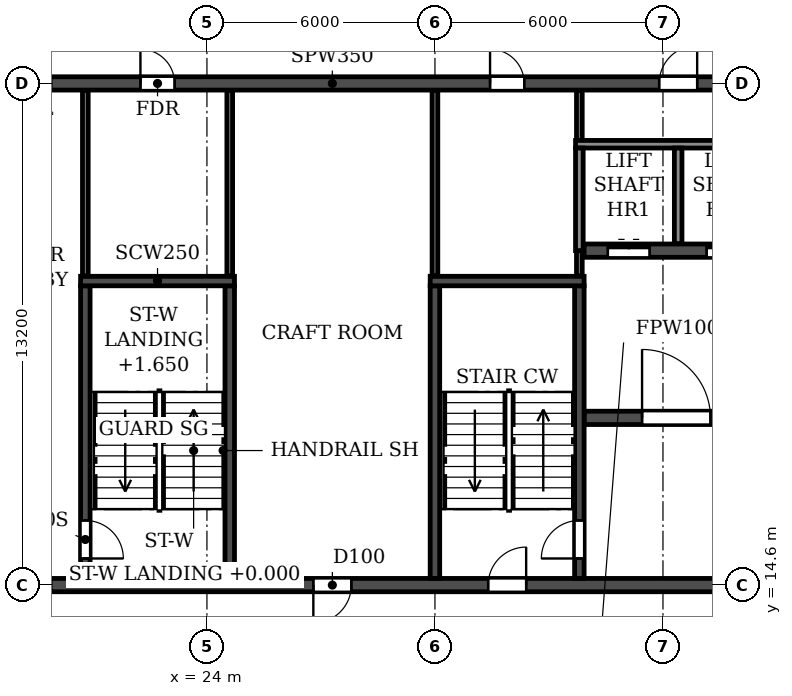
"""IFC4 building model, lengths in metres.
Left out: names, types, materials, properties, quantities, classifications, styles, units other than length and angle.
Written with IfcOpenShell. Run it as: python <this file> out.ifc"""

import sys

from ifc_helpers import new_model, si_unit, direction, frame, frame_2d, origin, place, context, subcontext, project, spatial, rectangle, extrude, element, fill, save


model = new_model("IFC4")
c1 = context("Model", 3, precision=1e-05, world=origin(), true_north=direction((0.0, 1.0)))
c2 = subcontext(c1, "Body", "Model", "MODEL_VIEW")
j1 = project(units=[si_unit("LENGTHUNIT", "METRE"), si_unit("PLANEANGLEUNIT", "RADIAN")], contexts=[c1])
p1 = place(None, origin())
s1 = spatial("IfcSite", under=j1, at=p1, CompositionType="ELEMENT")
p2 = place(p1, origin())
s2 = spatial("IfcBuilding", under=s1, at=p2, CompositionType="ELEMENT")
p3 = place(p2, frame((0.0, 0.0, 221.4)))
s3 = spatial("IfcBuildingStorey", under=s2, at=p3, CompositionType="ELEMENT", Elevation=221.4)
p4 = place(p3, frame((18.2, 14.6, 0.0), z_axis=(0.0, 0.0, 1.0), x_axis=(1.0, 0.0, 0.0)))
e1 = element("IfcWall", 1, at=p4, inside=s3, PredefinedType="SOLIDWALL", context=c2, shape_type="SweptSolid", body=[
    extrude(rectangle(XDim=65.6, YDim=0.35, at=frame_2d((32.8, 0.0))), origin(), (0.0, 0.0, 1.0), 3.08),
])
p5 = place(p4, frame((0.7, 0.0, 0.0)))
e2 = element("IfcOpeningElement", 2, at=p5, cuts=e1, PredefinedType="OPENING", context=c2, shape_type="SweptSolid", body=[
    extrude(rectangle(XDim=1.0, YDim=2.1, at=frame_2d((0.5, 1.05))), frame((0.0, 0.185, 0.0), z_axis=(0.0, -1.0, 0.0), x_axis=(1.0, 0.0, 0.0)), (0.0, 0.0, 1.0), 0.37),
])
p6 = place(p4, frame((8.6, 0.0, 0.0)))
e3 = element("IfcOpeningElement", 3, at=p6, cuts=e1, PredefinedType="OPENING", context=c2, shape_type="SweptSolid", body=[
    extrude(rectangle(XDim=1.0, YDim=2.1, at=frame_2d((0.5, 1.05))), frame((0.0, 0.185, 0.0), z_axis=(0.0, -1.0, 0.0), x_axis=(1.0, 0.0, 0.0)), (0.0, 0.0, 1.0), 0.37),
])
p7 = place(p4, frame((13.2, 0.0, 0.0)))
e4 = element("IfcOpeningElement", 4, at=p7, cuts=e1, PredefinedType="OPENING", context=c2, shape_type="SweptSolid", body=[
    extrude(rectangle(XDim=1.0, YDim=2.1, at=frame_2d((0.5, 1.05))), frame((0.0, 0.185, 0.0), z_axis=(0.0, -1.0, 0.0), x_axis=(1.0, 0.0, 0.0)), (0.0, 0.0, 1.0), 0.37),
])
p8 = place(p4, frame((27.1, 0.0, 0.0)))
e5 = element("IfcOpeningElement", 5, at=p8, cuts=e1, PredefinedType="OPENING", context=c2, shape_type="SweptSolid", body=[
    extrude(rectangle(XDim=1.0, YDim=2.1, at=frame_2d((0.5, 1.05))), frame((0.0, 0.185, 0.0), z_axis=(0.0, -1.0, 0.0), x_axis=(1.0, 0.0, 0.0)), (0.0, 0.0, 1.0), 0.37),
])
p9 = place(p4, frame((32.3, 0.0, 0.0)))
e6 = element("IfcOpeningElement", 6, at=p9, cuts=e1, PredefinedType="OPENING", context=c2, shape_type="SweptSolid", body=[
    extrude(rectangle(XDim=1.0, YDim=2.1, at=frame_2d((0.5, 1.05))), frame((0.0, 0.185, 0.0), z_axis=(0.0, -1.0, 0.0), x_axis=(1.0, 0.0, 0.0)), (0.0, 0.0, 1.0), 0.37),
])
p10 = place(p4, frame((35.95, 0.0, 0.0)))
e7 = element("IfcOpeningElement", 7, at=p10, cuts=e1, PredefinedType="OPENING", context=c2, shape_type="SweptSolid", body=[
    extrude(rectangle(XDim=1.5, YDim=2.1, at=frame_2d((0.75, 1.05))), frame((0.0, 0.185, 0.0), z_axis=(0.0, -1.0, 0.0), x_axis=(1.0, 0.0, 0.0)), (0.0, 0.0, 1.0), 0.37),
])
p11 = place(p4, frame((40.1, 0.0, 0.0)))
e8 = element("IfcOpeningElement", 8, at=p11, cuts=e1, PredefinedType="OPENING", context=c2, shape_type="SweptSolid", body=[
    extrude(rectangle(XDim=1.0, YDim=2.1, at=frame_2d((0.5, 1.05))), frame((0.0, 0.185, 0.0), z_axis=(0.0, -1.0, 0.0), x_axis=(1.0, 0.0, 0.0)), (0.0, 0.0, 1.0), 0.37),
])
p12 = place(p4, frame((51.4, 0.0, 0.0)))
e9 = element("IfcOpeningElement", 9, at=p12, cuts=e1, PredefinedType="OPENING", context=c2, shape_type="SweptSolid", body=[
    extrude(rectangle(XDim=1.0, YDim=2.1, at=frame_2d((0.5, 1.05))), frame((0.0, 0.185, 0.0), z_axis=(0.0, -1.0, 0.0), x_axis=(1.0, 0.0, 0.0)), (0.0, 0.0, 1.0), 0.37),
])
p13 = place(p4, frame((56.0, 0.0, 0.0)))
e10 = element("IfcOpeningElement", 10, at=p13, cuts=e1, PredefinedType="OPENING", context=c2, shape_type="SweptSolid", body=[
    extrude(rectangle(XDim=1.0, YDim=2.1, at=frame_2d((0.5, 1.05))), frame((0.0, 0.185, 0.0), z_axis=(0.0, -1.0, 0.0), x_axis=(1.0, 0.0, 0.0)), (0.0, 0.0, 1.0), 0.37),
])
p14 = place(p4, frame((63.9, 0.0, 0.0)))
e11 = element("IfcOpeningElement", 11, at=p14, cuts=e1, PredefinedType="OPENING", context=c2, shape_type="SweptSolid", body=[
    extrude(rectangle(XDim=1.0, YDim=2.1, at=frame_2d((0.5, 1.05))), frame((0.0, 0.185, 0.0), z_axis=(0.0, -1.0, 0.0), x_axis=(1.0, 0.0, 0.0)), (0.0, 0.0, 1.0), 0.37),
])
p15 = place(p3, frame((18.2, 27.8, 0.0), z_axis=(0.0, 0.0, 1.0), x_axis=(1.0, 0.0, 0.0)))
e12 = element("IfcWall", 12, at=p15, inside=s3, PredefinedType="SOLIDWALL", context=c2, shape_type="SweptSolid", body=[
    extrude(rectangle(XDim=65.6, YDim=0.35, at=frame_2d((32.8, 0.0))), origin(), (0.0, 0.0, 1.0), 3.08),
])
p16 = place(p15, frame((0.7, 0.0, 0.0)))
e13 = element("IfcOpeningElement", 13, at=p16, cuts=e12, PredefinedType="OPENING", context=c2, shape_type="SweptSolid", body=[
    extrude(rectangle(XDim=1.0, YDim=2.1, at=frame_2d((0.5, 1.05))), frame((0.0, 0.185, 0.0), z_axis=(0.0, -1.0, 0.0), x_axis=(1.0, 0.0, 0.0)), (0.0, 0.0, 1.0), 0.37),
])
p17 = place(p15, frame((4.05, 0.0, 0.0)))
e14 = element("IfcOpeningElement", 14, at=p17, cuts=e12, PredefinedType="OPENING", context=c2, shape_type="SweptSolid", body=[
    extrude(rectangle(XDim=0.9, YDim=2.1, at=frame_2d((0.45, 1.05))), frame((0.0, 0.185, 0.0), z_axis=(0.0, -1.0, 0.0), x_axis=(1.0, 0.0, 0.0)), (0.0, 0.0, 1.0), 0.37),
])
p18 = place(p15, frame((13.25, 0.0, 0.0)))
e15 = element("IfcOpeningElement", 15, at=p18, cuts=e12, PredefinedType="OPENING", context=c2, shape_type="SweptSolid", body=[
    extrude(rectangle(XDim=0.9, YDim=2.1, at=frame_2d((0.45, 1.05))), frame((0.0, 0.185, 0.0), z_axis=(0.0, -1.0, 0.0), x_axis=(1.0, 0.0, 0.0)), (0.0, 0.0, 1.0), 0.37),
])
p19 = place(p15, frame((17.7, 0.0, 0.0)))
e16 = element("IfcOpeningElement", 16, at=p19, cuts=e12, PredefinedType="OPENING", context=c2, shape_type="SweptSolid", body=[
    extrude(rectangle(XDim=1.0, YDim=2.1, at=frame_2d((0.5, 1.05))), frame((0.0, 0.185, 0.0), z_axis=(0.0, -1.0, 0.0), x_axis=(1.0, 0.0, 0.0)), (0.0, 0.0, 1.0), 0.37),
])
p20 = place(p15, frame((22.9, 0.0, 0.0)))
e17 = element("IfcOpeningElement", 17, at=p20, cuts=e12, PredefinedType="OPENING", context=c2, shape_type="SweptSolid", body=[
    extrude(rectangle(XDim=1.0, YDim=2.1, at=frame_2d((0.5, 1.05))), frame((0.0, 0.185, 0.0), z_axis=(0.0, -1.0, 0.0), x_axis=(1.0, 0.0, 0.0)), (0.0, 0.0, 1.0), 0.37),
])
p21 = place(p15, frame((29.4, 0.0, 0.0)))
e18 = element("IfcOpeningElement", 18, at=p21, cuts=e12, PredefinedType="OPENING", context=c2, shape_type="SweptSolid", body=[
    extrude(rectangle(XDim=1.0, YDim=2.1, at=frame_2d((0.5, 1.05))), frame((0.0, 0.185, 0.0), z_axis=(0.0, -1.0, 0.0), x_axis=(1.0, 0.0, 0.0)), (0.0, 0.0, 1.0), 0.37),
])
p22 = place(p15, frame((32.3, 0.0, 0.0)))
e19 = element("IfcOpeningElement", 19, at=p22, cuts=e12, PredefinedType="OPENING", context=c2, shape_type="SweptSolid", body=[
    extrude(rectangle(XDim=1.0, YDim=2.1, at=frame_2d((0.5, 1.05))), frame((0.0, 0.185, 0.0), z_axis=(0.0, -1.0, 0.0), x_axis=(1.0, 0.0, 0.0)), (0.0, 0.0, 1.0), 0.37),
])
p23 = place(p15, frame((36.25, 0.0, 0.0)))
e20 = element("IfcOpeningElement", 20, at=p23, cuts=e12, PredefinedType="OPENING", context=c2, shape_type="SweptSolid", body=[
    extrude(rectangle(XDim=1.5, YDim=2.1, at=frame_2d((0.75, 1.05))), frame((0.0, 0.185, 0.0), z_axis=(0.0, -1.0, 0.0), x_axis=(1.0, 0.0, 0.0)), (0.0, 0.0, 1.0), 0.37),
])
p24 = place(p15, frame((41.7, 0.0, 0.0)))
e21 = element("IfcOpeningElement", 21, at=p24, cuts=e12, PredefinedType="OPENING", context=c2, shape_type="SweptSolid", body=[
    extrude(rectangle(XDim=1.0, YDim=2.1, at=frame_2d((0.5, 1.05))), frame((0.0, 0.185, 0.0), z_axis=(0.0, -1.0, 0.0), x_axis=(1.0, 0.0, 0.0)), (0.0, 0.0, 1.0), 0.37),
])
p25 = place(p15, frame((46.9, 0.0, 0.0)))
e22 = element("IfcOpeningElement", 22, at=p25, cuts=e12, PredefinedType="OPENING", context=c2, shape_type="SweptSolid", body=[
    extrude(rectangle(XDim=1.0, YDim=2.1, at=frame_2d((0.5, 1.05))), frame((0.0, 0.185, 0.0), z_axis=(0.0, -1.0, 0.0), x_axis=(1.0, 0.0, 0.0)), (0.0, 0.0, 1.0), 0.37),
])
p26 = place(p15, frame((51.45, 0.0, 0.0)))
e23 = element("IfcOpeningElement", 23, at=p26, cuts=e12, PredefinedType="OPENING", context=c2, shape_type="SweptSolid", body=[
    extrude(rectangle(XDim=0.9, YDim=2.1, at=frame_2d((0.45, 1.05))), frame((0.0, 0.185, 0.0), z_axis=(0.0, -1.0, 0.0), x_axis=(1.0, 0.0, 0.0)), (0.0, 0.0, 1.0), 0.37),
])
p27 = place(p15, frame((60.65, 0.0, 0.0)))
e24 = element("IfcOpeningElement", 24, at=p27, cuts=e12, PredefinedType="OPENING", context=c2, shape_type="SweptSolid", body=[
    extrude(rectangle(XDim=0.9, YDim=2.1, at=frame_2d((0.45, 1.05))), frame((0.0, 0.185, 0.0), z_axis=(0.0, -1.0, 0.0), x_axis=(1.0, 0.0, 0.0)), (0.0, 0.0, 1.0), 0.37),
])
p28 = place(p15, frame((63.9, 0.0, 0.0)))
e25 = element("IfcOpeningElement", 25, at=p28, cuts=e12, PredefinedType="OPENING", context=c2, shape_type="SweptSolid", body=[
    extrude(rectangle(XDim=1.0, YDim=2.1, at=frame_2d((0.5, 1.05))), frame((0.0, 0.185, 0.0), z_axis=(0.0, -1.0, 0.0), x_axis=(1.0, 0.0, 0.0)), (0.0, 0.0, 1.0), 0.37),
])
p29 = place(p3, frame((33.925, 19.0, 0.0), z_axis=(0.0, 0.0, 1.0), x_axis=(1.0, 0.0, 0.0)))
e26 = element("IfcWall", 26, at=p29, inside=s3, PredefinedType="SOLIDWALL", context=c2, shape_type="SweptSolid", body=[
    extrude(rectangle(XDim=34.15, YDim=0.35, at=frame_2d((17.075, 0.0))), origin(), (0.0, 0.0, 1.0), 3.08),
])
p30 = place(p29, frame((16.175, 0.0, 0.0)))
e27 = element("IfcOpeningElement", 27, at=p30, cuts=e26, PredefinedType="OPENING", context=c2, shape_type="SweptSolid", body=[
    extrude(rectangle(XDim=1.8, YDim=2.1, at=frame_2d((0.9, 1.05))), frame((0.0, 0.185, 0.0), z_axis=(0.0, -1.0, 0.0), x_axis=(1.0, 0.0, 0.0)), (0.0, 0.0, 1.0), 0.37),
])
p31 = place(p29, frame((1.525, 0.0, 0.0)))
e28 = element("IfcOpeningElement", 28, at=p31, cuts=e26, PredefinedType="OPENING", context=c2, shape_type="SweptSolid", body=[
    extrude(rectangle(XDim=1.8, YDim=2.1, at=frame_2d((0.9, 1.05))), frame((0.0, 0.185, 0.0), z_axis=(0.0, -1.0, 0.0), x_axis=(1.0, 0.0, 0.0)), (0.0, 0.0, 1.0), 0.37),
])
p32 = place(p29, frame((30.825, 0.0, 0.0)))
e29 = element("IfcOpeningElement", 29, at=p32, cuts=e26, PredefinedType="OPENING", context=c2, shape_type="SweptSolid", body=[
    extrude(rectangle(XDim=1.8, YDim=2.1, at=frame_2d((0.9, 1.05))), frame((0.0, 0.185, 0.0), z_axis=(0.0, -1.0, 0.0), x_axis=(1.0, 0.0, 0.0)), (0.0, 0.0, 1.0), 0.37),
])
p33 = place(p3, frame((33.925, 23.4, 0.0), z_axis=(0.0, 0.0, 1.0), x_axis=(1.0, 0.0, 0.0)))
e30 = element("IfcWall", 30, at=p33, inside=s3, PredefinedType="SOLIDWALL", context=c2, shape_type="SweptSolid", body=[
    extrude(rectangle(XDim=34.15, YDim=0.35, at=frame_2d((17.075, 0.0))), origin(), (0.0, 0.0, 1.0), 3.08),
])
p34 = place(p33, frame((16.175, 0.0, 0.0)))
e31 = element("IfcOpeningElement", 31, at=p34, cuts=e30, PredefinedType="OPENING", context=c2, shape_type="SweptSolid", body=[
    extrude(rectangle(XDim=1.8, YDim=2.1, at=frame_2d((0.9, 1.05))), frame((0.0, 0.185, 0.0), z_axis=(0.0, -1.0, 0.0), x_axis=(1.0, 0.0, 0.0)), (0.0, 0.0, 1.0), 0.37),
])
p35 = place(p33, frame((0.625, 0.0, 0.0)))
e32 = element("IfcOpeningElement", 32, at=p35, cuts=e30, PredefinedType="OPENING", context=c2, shape_type="SweptSolid", body=[
    extrude(rectangle(XDim=1.1, YDim=2.1, at=frame_2d((0.55, 1.05))), frame((0.0, 0.185, 0.0), z_axis=(0.0, -1.0, 0.0), x_axis=(1.0, 0.0, 0.0)), (0.0, 0.0, 1.0), 0.37),
])
p36 = place(p33, frame((3.225, 0.0, 0.0)))
e33 = element("IfcOpeningElement", 33, at=p36, cuts=e30, PredefinedType="OPENING", context=c2, shape_type="SweptSolid", body=[
    extrude(rectangle(XDim=1.1, YDim=2.1, at=frame_2d((0.55, 1.05))), frame((0.0, 0.185, 0.0), z_axis=(0.0, -1.0, 0.0), x_axis=(1.0, 0.0, 0.0)), (0.0, 0.0, 1.0), 0.37),
])
p37 = place(p33, frame((5.825, 0.0, 0.0)))
e34 = element("IfcOpeningElement", 34, at=p37, cuts=e30, PredefinedType="OPENING", context=c2, shape_type="SweptSolid", body=[
    extrude(rectangle(XDim=1.1, YDim=2.1, at=frame_2d((0.55, 1.05))), frame((0.0, 0.185, 0.0), z_axis=(0.0, -1.0, 0.0), x_axis=(1.0, 0.0, 0.0)), (0.0, 0.0, 1.0), 0.37),
])
p38 = place(p33, frame((8.425, 0.0, 0.0)))
e35 = element("IfcOpeningElement", 35, at=p38, cuts=e30, PredefinedType="OPENING", context=c2, shape_type="SweptSolid", body=[
    extrude(rectangle(XDim=1.1, YDim=2.1, at=frame_2d((0.55, 1.05))), frame((0.0, 0.185, 0.0), z_axis=(0.0, -1.0, 0.0), x_axis=(1.0, 0.0, 0.0)), (0.0, 0.0, 1.0), 0.37),
])
p39 = place(p33, frame((11.025, 0.0, 0.0)))
e36 = element("IfcOpeningElement", 36, at=p39, cuts=e30, PredefinedType="OPENING", context=c2, shape_type="SweptSolid", body=[
    extrude(rectangle(XDim=1.1, YDim=2.1, at=frame_2d((0.55, 1.05))), frame((0.0, 0.185, 0.0), z_axis=(0.0, -1.0, 0.0), x_axis=(1.0, 0.0, 0.0)), (0.0, 0.0, 1.0), 0.37),
])
p40 = place(p33, frame((13.625, 0.0, 0.0)))
e37 = element("IfcOpeningElement", 37, at=p40, cuts=e30, PredefinedType="OPENING", context=c2, shape_type="SweptSolid", body=[
    extrude(rectangle(XDim=1.1, YDim=2.1, at=frame_2d((0.55, 1.05))), frame((0.0, 0.185, 0.0), z_axis=(0.0, -1.0, 0.0), x_axis=(1.0, 0.0, 0.0)), (0.0, 0.0, 1.0), 0.37),
])
p41 = place(p33, frame((27.225, 0.0, 0.0)))
e38 = element("IfcOpeningElement", 38, at=p41, cuts=e30, PredefinedType="OPENING", context=c2, shape_type="SweptSolid", body=[
    extrude(rectangle(XDim=1.1, YDim=2.1, at=frame_2d((0.55, 1.05))), frame((0.0, 0.185, 0.0), z_axis=(0.0, -1.0, 0.0), x_axis=(1.0, 0.0, 0.0)), (0.0, 0.0, 1.0), 0.37),
])
p42 = place(p3, frame((30.0, 14.775, 0.0), z_axis=(0.0, 0.0, 1.0), x_axis=(0.0, 1.0, 0.0)))
e39 = element("IfcWall", 39, at=p42, inside=s3, PredefinedType="SOLIDWALL", context=c2, shape_type="SweptSolid", body=[
    extrude(rectangle(XDim=7.7, YDim=0.25, at=frame_2d((3.85, 0.0))), origin(), (0.0, 0.0, 1.0), 3.08),
])
p43 = place(p3, frame((33.8, 14.775, 0.0), z_axis=(0.0, 0.0, 1.0), x_axis=(0.0, 1.0, 0.0)))
e40 = element("IfcWall", 40, at=p43, inside=s3, PredefinedType="SOLIDWALL", context=c2, shape_type="SweptSolid", body=[
    extrude(rectangle(XDim=7.7, YDim=0.25, at=frame_2d((3.85, 0.0))), origin(), (0.0, 0.0, 1.0), 3.08),
])
p44 = place(p43, frame((0.525, 0.0, 0.0)))
e41 = element("IfcOpeningElement", 41, at=p44, cuts=e40, PredefinedType="OPENING", context=c2, shape_type="SweptSolid", body=[
    extrude(rectangle(XDim=1.0, YDim=2.1, at=frame_2d((0.5, 1.05))), frame((0.0, 0.135, 0.0), z_axis=(0.0, -1.0, 0.0), x_axis=(1.0, 0.0, 0.0)), (0.0, 0.0, 1.0), 0.27),
])
p45 = place(p3, frame((29.875, 22.6, 0.0), z_axis=(0.0, 0.0, 1.0), x_axis=(1.0, 0.0, 0.0)))
e42 = element("IfcWall", 42, at=p45, inside=s3, PredefinedType="SOLIDWALL", context=c2, shape_type="SweptSolid", body=[
    extrude(rectangle(XDim=4.05, YDim=0.25, at=frame_2d((2.025, 0.0))), origin(), (0.0, 0.0, 1.0), 3.08),
])
p46 = place(p3, frame((20.8, 14.775, 0.0), z_axis=(0.0, 0.0, 1.0), x_axis=(0.0, 1.0, 0.0)))
e43 = element("IfcWall", 43, at=p46, inside=s3, PredefinedType="SOLIDWALL", context=c2, shape_type="SweptSolid", body=[
    extrude(rectangle(XDim=7.7, YDim=0.25, at=frame_2d((3.85, 0.0))), origin(), (0.0, 0.0, 1.0), 3.08),
])
p47 = place(p46, frame((0.525, 0.0, 0.0)))
e44 = element("IfcOpeningElement", 44, at=p47, cuts=e43, PredefinedType="OPENING", context=c2, shape_type="SweptSolid", body=[
    extrude(rectangle(XDim=1.0, YDim=2.1, at=frame_2d((0.5, 1.05))), frame((0.0, 0.135, 0.0), z_axis=(0.0, -1.0, 0.0), x_axis=(1.0, 0.0, 0.0)), (0.0, 0.0, 1.0), 0.27),
])
p48 = place(p3, frame((24.6, 14.775, 0.0), z_axis=(0.0, 0.0, 1.0), x_axis=(0.0, 1.0, 0.0)))
e45 = element("IfcWall", 45, at=p48, inside=s3, PredefinedType="SOLIDWALL", context=c2, shape_type="SweptSolid", body=[
    extrude(rectangle(XDim=7.7, YDim=0.25, at=frame_2d((3.85, 0.0))), origin(), (0.0, 0.0, 1.0), 3.08),
])
p49 = place(p3, frame((20.675, 22.6, 0.0), z_axis=(0.0, 0.0, 1.0), x_axis=(1.0, 0.0, 0.0)))
e46 = element("IfcWall", 46, at=p49, inside=s3, PredefinedType="SOLIDWALL", context=c2, shape_type="SweptSolid", body=[
    extrude(rectangle(XDim=4.05, YDim=0.25, at=frame_2d((2.025, 0.0))), origin(), (0.0, 0.0, 1.0), 3.08),
])
for number, where, z_axis, x_axis in (
    (47, (20.8, 22.735, 0.0), (0.0, 0.0, 1.0), (0.0, 1.0, 0.0)),
    (48, (24.6, 22.735, 0.0), (0.0, 0.0, 1.0), (0.0, 1.0, 0.0)),
    (49, (30.0, 22.735, 0.0), (0.0, 0.0, 1.0), (0.0, 1.0, 0.0)),
):
    element("IfcWall", number, at=place(p3, frame(where, z_axis=z_axis, x_axis=x_axis)), inside=s3, PredefinedType="PARTITIONING", context=c2, shape_type="SweptSolid", body=[
        extrude(rectangle(XDim=4.88, YDim=0.15, at=frame_2d((2.44, 0.0))), origin(), (0.0, 0.0, 1.0), 3.08),
    ])
p50 = place(p3, frame((33.8, 22.735, 0.0), z_axis=(0.0, 0.0, 1.0), x_axis=(0.0, 1.0, 0.0)))
e50 = element("IfcWall", 50, at=p50, inside=s3, PredefinedType="PARTITIONING", context=c2, shape_type="SweptSolid", body=[
    extrude(rectangle(XDim=0.665, YDim=0.15, at=frame_2d((0.333, 0.0))), origin(), (0.0, 0.0, 1.0), 3.08),
])
p51 = place(p3, frame((33.8, 26.3, 0.0), z_axis=(0.0, 0.0, 1.0), x_axis=(0.0, 1.0, 0.0)))
e51 = element("IfcWall", 51, at=p51, inside=s3, PredefinedType="PARTITIONING", context=c2, shape_type="SweptSolid", body=[
    extrude(rectangle(XDim=1.315, YDim=0.15, at=frame_2d((0.657, 0.0))), origin(), (0.0, 0.0, 1.0), 3.08),
])
p52 = place(p3, frame((33.7, 26.2, 0.0), z_axis=(0.0, 0.0, 1.0), x_axis=(1.0, 0.0, 0.0)))
e52 = element("IfcWall", 52, at=p52, inside=s3, PredefinedType="PARTITIONING", context=c2, shape_type="SweptSolid", body=[
    extrude(rectangle(XDim=10.4, YDim=0.2, at=frame_2d((5.2, 0.0))), origin(), (0.0, 0.0, 1.0), 3.08),
])
p53 = place(p3, frame((33.8, 23.4, 0.0), z_axis=(0.0, 0.0, 1.0), x_axis=(0.0, 1.0, 0.0)))
e53 = element("IfcWall", 53, at=p53, inside=s3, PredefinedType="PARTITIONING", context=c2, shape_type="SweptSolid", body=[
    extrude(rectangle(XDim=2.7, YDim=0.2, at=frame_2d((1.35, 0.0))), origin(), (0.0, 0.0, 1.0), 3.08),
])
p54 = place(p3, frame((36.4, 23.585, 0.0), z_axis=(0.0, 0.0, 1.0), x_axis=(0.0, 1.0, 0.0)))
e54 = element("IfcWall", 54, at=p54, inside=s3, PredefinedType="PARTITIONING", context=c2, shape_type="SweptSolid", body=[
    extrude(rectangle(XDim=2.515, YDim=0.2, at=frame_2d((1.258, 0.0))), origin(), (0.0, 0.0, 1.0), 3.08),
])
p55 = place(p17, origin())
e55 = element("IfcDoor", 55, at=p55, inside=s3, OperationType="SINGLE_SWING_LEFT", PredefinedType="DOOR", context=c2, shape_type="SweptSolid", body=[
    extrude(rectangle(XDim=0.9, YDim=2.1, at=frame_2d((0.45, 1.05))), frame((0.0, 0.025, 0.0), z_axis=(0.0, -1.0, 0.0), x_axis=(1.0, 0.0, 0.0)), (0.0, 0.0, 1.0), 0.05),
])
fill(e14, e55)
p56 = place(p18, origin())
e56 = element("IfcDoor", 56, at=p56, inside=s3, OperationType="SINGLE_SWING_LEFT", PredefinedType="DOOR", context=c2, shape_type="SweptSolid", body=[
    extrude(rectangle(XDim=0.9, YDim=2.1, at=frame_2d((0.45, 1.05))), frame((0.0, 0.025, 0.0), z_axis=(0.0, -1.0, 0.0), x_axis=(1.0, 0.0, 0.0)), (0.0, 0.0, 1.0), 0.05),
])
fill(e15, e56)
p57 = place(p19, origin())
e57 = element("IfcDoor", 57, at=p57, inside=s3, OperationType="SINGLE_SWING_RIGHT", PredefinedType="DOOR", context=c2, shape_type="SweptSolid", body=[
    extrude(rectangle(XDim=1.0, YDim=2.1, at=frame_2d((0.5, 1.05))), frame((0.0, 0.025, 0.0), z_axis=(0.0, -1.0, 0.0), x_axis=(1.0, 0.0, 0.0)), (0.0, 0.0, 1.0), 0.05),
])
fill(e16, e57)
p58 = place(p6, frame((1.0, 0.0, 0.0), z_axis=(0.0, 0.0, 1.0), x_axis=(-1.0, 0.0, 0.0)))
e58 = element("IfcDoor", 58, at=p58, inside=s3, OperationType="SINGLE_SWING_RIGHT", PredefinedType="DOOR", context=c2, shape_type="SweptSolid", body=[
    extrude(rectangle(XDim=1.0, YDim=2.1, at=frame_2d((0.5, 1.05))), frame((0.0, 0.025, 0.0), z_axis=(0.0, -1.0, 0.0), x_axis=(1.0, 0.0, 0.0)), (0.0, 0.0, 1.0), 0.05),
])
fill(e3, e58)
p59 = place(p7, origin())
e59 = element("IfcDoor", 59, at=p59, inside=s3, OperationType="SINGLE_SWING_RIGHT", PredefinedType="DOOR", context=c2, shape_type="SweptSolid", body=[
    extrude(rectangle(XDim=1.0, YDim=2.1, at=frame_2d((0.5, 1.05))), frame((0.0, 0.025, 0.0), z_axis=(0.0, -1.0, 0.0), x_axis=(1.0, 0.0, 0.0)), (0.0, 0.0, 1.0), 0.05),
])
fill(e4, e59)
p60 = place(p44, origin())
e60 = element("IfcDoor", 60, at=p60, inside=s3, OperationType="SINGLE_SWING_LEFT", PredefinedType="DOOR", context=c2, shape_type="SweptSolid", body=[
    extrude(rectangle(XDim=1.0, YDim=2.1, at=frame_2d((0.5, 1.05))), frame((0.0, 0.025, 0.0), z_axis=(0.0, -1.0, 0.0), x_axis=(1.0, 0.0, 0.0)), (0.0, 0.0, 1.0), 0.05),
])
fill(e41, e60)
p61 = place(p35, origin())
e61 = element("IfcDoor", 61, at=p61, inside=s3, OperationType="DOUBLE_DOOR_SLIDING", PredefinedType="DOOR", context=c2, shape_type="SweptSolid", body=[
    extrude(rectangle(XDim=1.1, YDim=2.1, at=frame_2d((0.55, 1.05))), frame((0.0, 0.025, 0.0), z_axis=(0.0, -1.0, 0.0), x_axis=(1.0, 0.0, 0.0)), (0.0, 0.0, 1.0), 0.05),
])
fill(e32, e61)
p62 = place(p31, origin())
e62 = element("IfcDoor", 62, at=p62, inside=s3, OperationType="DOUBLE_DOOR_SINGLE_SWING", PredefinedType="DOOR", context=c2, shape_type="SweptSolid", body=[
    extrude(rectangle(XDim=1.8, YDim=2.1, at=frame_2d((0.9, 1.05))), frame((0.0, 0.025, 0.0), z_axis=(0.0, -1.0, 0.0), x_axis=(1.0, 0.0, 0.0)), (0.0, 0.0, 1.0), 0.05),
])
fill(e28, e62)
p63 = place(p36, origin())
e63 = element("IfcDoor", 63, at=p63, inside=s3, OperationType="DOUBLE_DOOR_SLIDING", PredefinedType="DOOR", context=c2, shape_type="SweptSolid", body=[
    extrude(rectangle(XDim=1.1, YDim=2.1, at=frame_2d((0.55, 1.05))), frame((0.0, 0.025, 0.0), z_axis=(0.0, -1.0, 0.0), x_axis=(1.0, 0.0, 0.0)), (0.0, 0.0, 1.0), 0.05),
])
fill(e33, e63)
p64 = place(p47, frame((1.0, 0.0, 0.0), z_axis=(0.0, 0.0, 1.0), x_axis=(-1.0, 0.0, 0.0)))
e64 = element("IfcDoor", 64, at=p64, inside=s3, OperationType="SINGLE_SWING_RIGHT", PredefinedType="DOOR", context=c2, shape_type="SweptSolid", body=[
    extrude(rectangle(XDim=1.0, YDim=2.1, at=frame_2d((0.5, 1.05))), frame((0.0, 0.025, 0.0), z_axis=(0.0, -1.0, 0.0), x_axis=(1.0, 0.0, 0.0)), (0.0, 0.0, 1.0), 0.05),
])
fill(e44, e64)
save(model, sys.argv[1])
